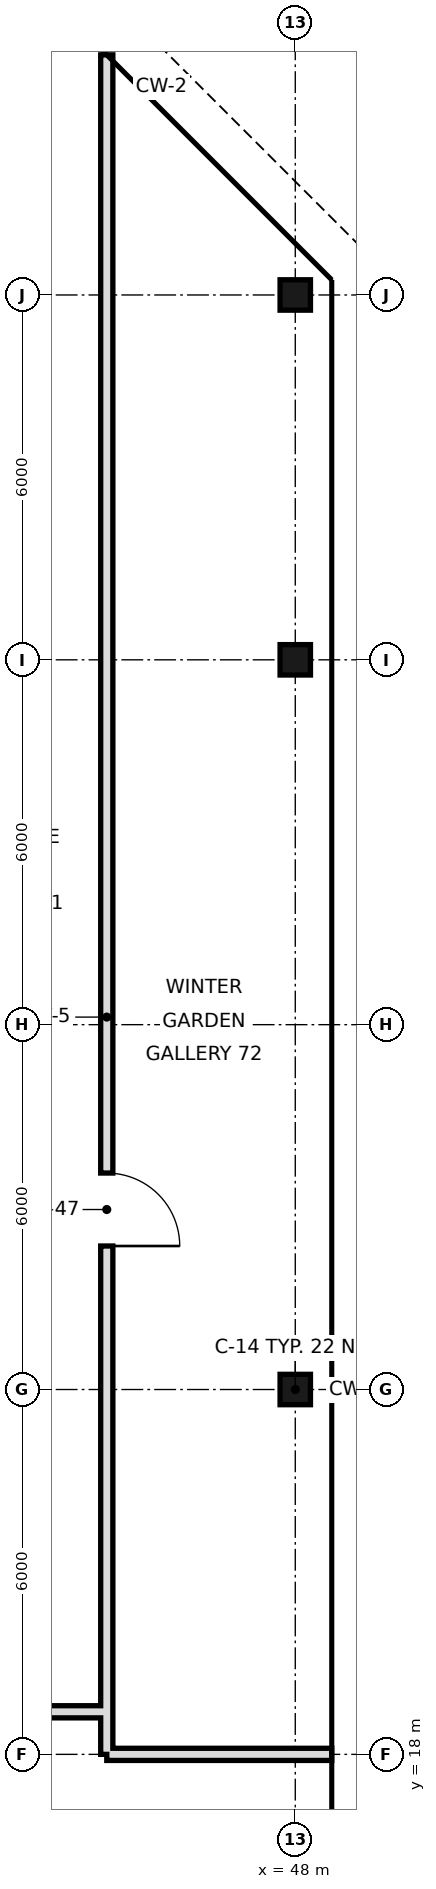
"""IFC4 building model, lengths in metres.
Left out: names, types, materials, properties, quantities, classifications, styles, units other than length and angle.
Written with IfcOpenShell. Run it as: python <this file> out.ifc"""

import sys

from ifc_helpers import new_model, si_unit, direction, frame, frame_2d, origin, origin_2d, place, context, subcontext, project, spatial, rectangle, hollow_rectangle, extrude, element, fill, save


model = new_model("IFC4")
c1 = context("Model", 3, precision=1e-05, world=origin(), true_north=direction((0.0, 1.0)))
c2 = subcontext(c1, "Body", "Model", "MODEL_VIEW")
j1 = project(units=[si_unit("LENGTHUNIT", "METRE"), si_unit("PLANEANGLEUNIT", "RADIAN")], contexts=[c1])
p1 = place(None, origin())
s1 = spatial("IfcSite", under=j1, at=p1, CompositionType="ELEMENT")
p2 = place(p1, origin())
s2 = spatial("IfcBuilding", under=s1, at=p2, CompositionType="ELEMENT")
p3 = place(p2, frame((0.0, 0.0, 305.2)))
s3 = spatial("IfcBuildingStorey", under=s2, at=p3, CompositionType="ELEMENT", Elevation=305.2)
for number, where, z_axis, x_axis in (
    (1, (48.0, 24.0, 0.0), (0.0, 0.0, 1.0), (1.0, 0.0, 0.0)),
    (2, (48.0, 36.0, 0.0), (0.0, 0.0, 1.0), (1.0, 0.0, 0.0)),
    (3, (48.0, 42.0, 0.0), (0.0, 0.0, 1.0), (1.0, 0.0, 0.0)),
):
    element("IfcColumn", number, at=place(p3, frame(where, z_axis=z_axis, x_axis=x_axis)), inside=s3, PredefinedType="COLUMN", context=c2, shape_type="SweptSolid", body=[
        extrude(hollow_rectangle(XDim=0.5, YDim=0.5, WallThickness=0.025, at=origin_2d()), origin(), (0.0, 0.0, 1.0), 3.6),
    ])
p4 = place(p3, frame((44.9, 18.0, 0.0), z_axis=(0.0, 0.0, 1.0), x_axis=(0.0, 1.0, 0.0)))
e4 = element("IfcWall", 4, at=p4, inside=s3, PredefinedType="SOLIDWALL", context=c2, shape_type="SweptSolid", body=[
    extrude(rectangle(XDim=27.949, YDim=0.2, at=frame_2d((13.975, 0.0))), origin(), (0.0, 0.0, 1.0), 2.97),
])
p5 = place(p4, frame((8.36, 0.0, 0.0)))
e5 = element("IfcOpeningElement", 5, at=p5, cuts=e4, PredefinedType="OPENING", context=c2, shape_type="SweptSolid", body=[
    extrude(rectangle(XDim=1.2, YDim=2.4, at=frame_2d((0.6, 1.2))), frame((0.0, 0.11, 0.0), z_axis=(0.0, -1.0, 0.0), x_axis=(1.0, 0.0, 0.0)), (0.0, 0.0, 1.0), 0.22),
])
p6 = place(p3, frame((44.9, 18.0, 0.0), z_axis=(0.0, 0.0, 1.0), x_axis=(1.0, 0.0, 0.0)))
e6 = element("IfcWall", 6, at=p6, inside=s3, PredefinedType="SOLIDWALL", context=c2, shape_type="SweptSolid", body=[
    extrude(rectangle(XDim=3.7, YDim=0.2, at=frame_2d((1.85, 0.0))), origin(), (0.0, 0.0, 1.0), 2.72),
])
p7 = place(p3, frame((24.6, 18.7, 0.0), z_axis=(0.0, 0.0, 1.0), x_axis=(1.0, 0.0, 0.0)))
e7 = element("IfcWall", 7, at=p7, inside=s3, PredefinedType="SOLIDWALL", context=c2, shape_type="SweptSolid", body=[
    extrude(rectangle(XDim=20.3, YDim=0.2, at=frame_2d((10.15, 0.0))), origin(), (0.0, 0.0, 1.0), 2.72),
])
p8 = place(p5, frame((1.2, 0.0, 0.0), z_axis=(0.0, 0.0, 1.0), x_axis=(-1.0, 0.0, 0.0)))
e8 = element("IfcDoor", 8, at=p8, inside=s3, OperationType="SINGLE_SWING_RIGHT", PredefinedType="DOOR", context=c2, shape_type="SweptSolid", body=[
    extrude(rectangle(XDim=1.2, YDim=2.4, at=frame_2d((0.6, 1.2))), frame((0.0, 0.025, 0.0), z_axis=(0.0, -1.0, 0.0), x_axis=(1.0, 0.0, 0.0)), (0.0, 0.0, 1.0), 0.05),
])
fill(e5, e8)
save(model, sys.argv[1])
